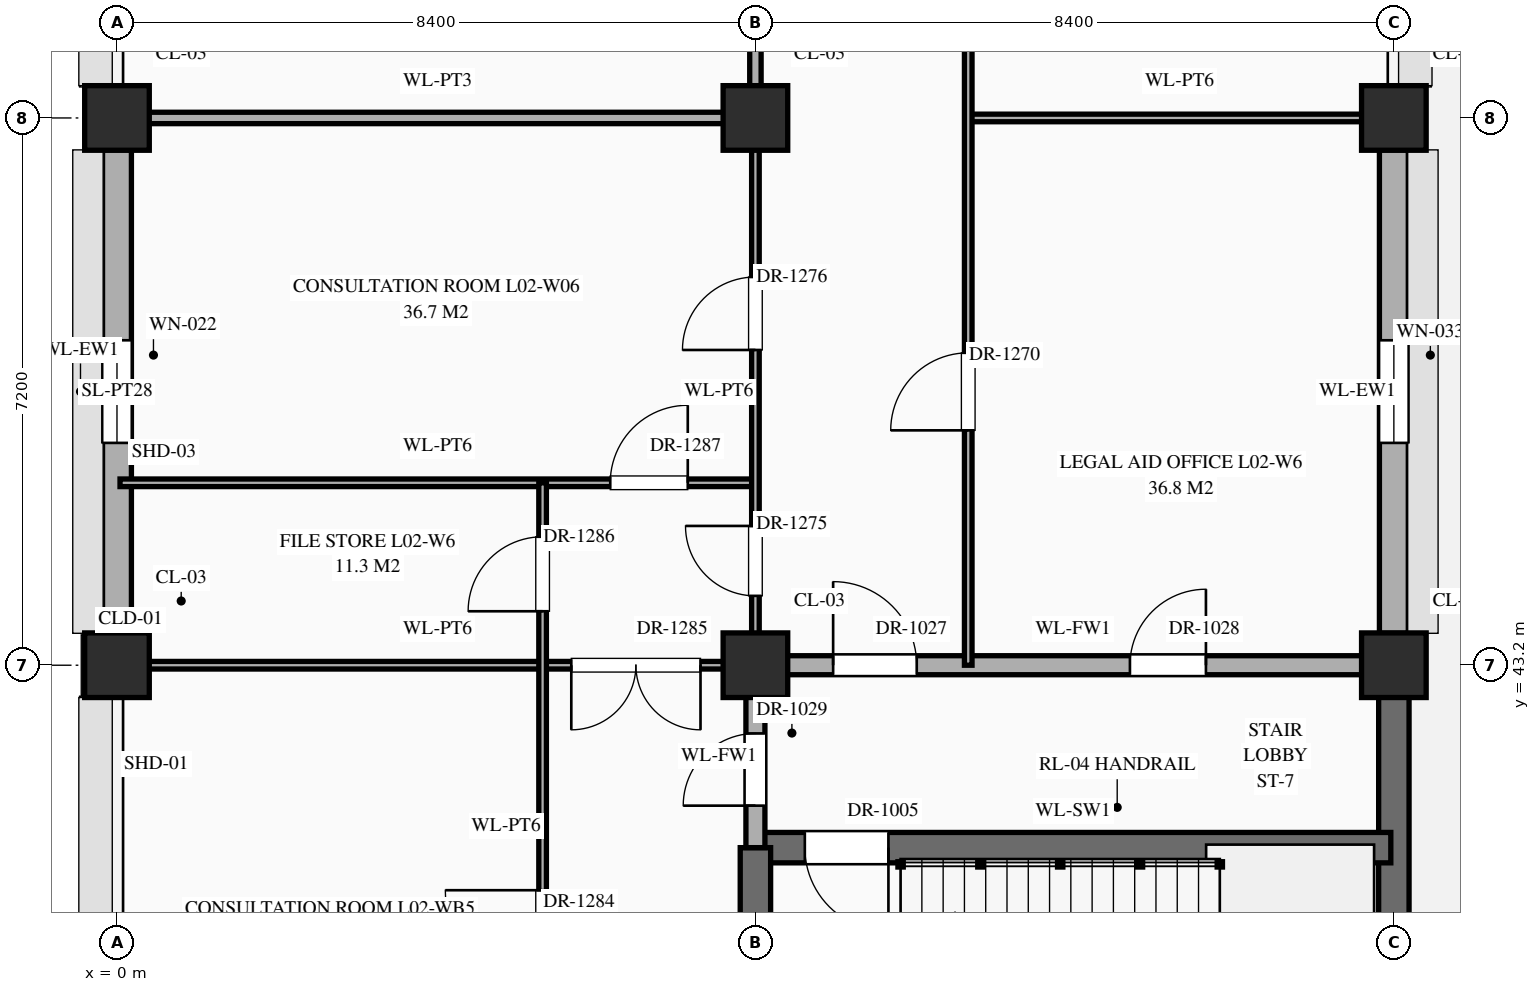
"""IFC4 building model, lengths in metres.
Left out: names, types, materials, properties, quantities, classifications, styles, units other than length and angle.
Written with IfcOpenShell. Run it as: python <this file> out.ifc"""

import sys

from ifc_helpers import new_model, si_unit, direction, frame, frame_2d, origin, origin_2d, place, context, subcontext, project, spatial, rectangle, extrude, element, fill, save


model = new_model("IFC4")
c1 = context("Model", 3, precision=1e-05, world=origin(), true_north=direction((0.0, 1.0)))
c2 = subcontext(c1, "Body", "Model", "MODEL_VIEW")
j1 = project(units=[si_unit("LENGTHUNIT", "METRE"), si_unit("PLANEANGLEUNIT", "RADIAN")], contexts=[c1])
p1 = place(None, origin())
s1 = spatial("IfcSite", under=j1, at=p1, CompositionType="ELEMENT")
p2 = place(p1, origin())
s2 = spatial("IfcBuilding", under=s1, at=p2, CompositionType="ELEMENT")
p3 = place(p2, frame((0.0, 0.0, 5.4)))
s3 = spatial("IfcBuildingStorey", under=s2, at=p3, CompositionType="ELEMENT", Elevation=5.4)
for number, where, z_axis, x_axis in (
    (1, (0.0, 43.2, 0.0), (0.0, 0.0, 1.0), (1.0, 0.0, 0.0)),
    (2, (0.0, 50.4, 0.0), (0.0, 0.0, 1.0), (1.0, 0.0, 0.0)),
    (3, (8.4, 43.2, 0.0), (0.0, 0.0, 1.0), (1.0, 0.0, 0.0)),
    (4, (8.4, 50.4, 0.0), (0.0, 0.0, 1.0), (1.0, 0.0, 0.0)),
    (5, (16.8, 43.2, 0.0), (0.0, 0.0, 1.0), (1.0, 0.0, 0.0)),
    (6, (16.8, 50.4, 0.0), (0.0, 0.0, 1.0), (1.0, 0.0, 0.0)),
):
    element("IfcColumn", number, at=place(p3, frame(where, z_axis=z_axis, x_axis=x_axis)), inside=s3, PredefinedType="COLUMN", context=c2, shape_type="SweptSolid", body=[
        extrude(rectangle(XDim=0.85, YDim=0.85, at=origin_2d()), origin(), (0.0, 0.0, 1.0), 5.4),
    ])
p4 = place(p3, frame((0.0, 43.62, 0.0), z_axis=(0.0, 0.0, 1.0), x_axis=(0.0, 1.0, 0.0)))
e7 = element("IfcWall", 7, at=p4, inside=s3, PredefinedType="STANDARD", context=c2, shape_type="SweptSolid", body=[
    extrude(rectangle(XDim=6.36, YDim=0.38, at=frame_2d((3.18, 0.0))), origin(), (0.0, 0.0, 1.0), 4.47),
])
p5 = place(p4, frame((2.505, 0.0, 0.85)))
e8 = element("IfcOpeningElement", 8, at=p5, cuts=e7, PredefinedType="OPENING", context=c2, shape_type="SweptSolid", body=[
    extrude(rectangle(XDim=1.35, YDim=1.56, at=frame_2d((0.675, 0.78))), frame((0.0, 0.202, 0.0), z_axis=(0.0, -1.0, 0.0), x_axis=(1.0, 0.0, 0.0)), (0.0, 0.0, 1.0), 0.404),
])
p6 = place(p3, frame((16.8, 36.42, 0.0), z_axis=(0.0, 0.0, 1.0), x_axis=(0.0, 1.0, 0.0)))
e9 = element("IfcWall", 9, at=p6, inside=s3, PredefinedType="SHEAR", context=c2, shape_type="SweptSolid", body=[
    extrude(rectangle(XDim=6.36, YDim=0.4, at=frame_2d((3.18, 0.0))), origin(), (0.0, 0.0, 1.0), 5.12),
])
p7 = place(p3, frame((16.8, 43.62, 0.0), z_axis=(0.0, 0.0, 1.0), x_axis=(0.0, 1.0, 0.0)))
e10 = element("IfcWall", 10, at=p7, inside=s3, PredefinedType="STANDARD", context=c2, shape_type="SweptSolid", body=[
    extrude(rectangle(XDim=6.36, YDim=0.38, at=frame_2d((3.18, 0.0))), origin(), (0.0, 0.0, 1.0), 4.47),
])
p8 = place(p7, frame((2.505, 0.0, 0.85)))
e11 = element("IfcOpeningElement", 11, at=p8, cuts=e10, PredefinedType="OPENING", context=c2, shape_type="SweptSolid", body=[
    extrude(rectangle(XDim=1.35, YDim=1.2, at=frame_2d((0.675, 0.6))), frame((0.0, 0.202, 0.0), z_axis=(0.0, -1.0, 0.0), x_axis=(1.0, 0.0, 0.0)), (0.0, 0.0, 1.0), 0.404),
])
p9 = place(p3, frame((8.4, 40.8, 0.0), z_axis=(0.0, 0.0, 1.0), x_axis=(1.0, 0.0, 0.0)))
e12 = element("IfcWall", 12, at=p9, inside=s3, PredefinedType="SHEAR", context=c2, shape_type="SweptSolid", body=[
    extrude(rectangle(XDim=8.36, YDim=0.4, at=frame_2d((4.18, 0.0))), origin(), (0.0, 0.0, 1.0), 5.12),
])
p10 = place(p9, frame((0.65, 0.0, 0.0)))
e13 = element("IfcOpeningElement", 13, at=p10, cuts=e12, PredefinedType="OPENING", context=c2, shape_type="SweptSolid", body=[
    extrude(rectangle(XDim=1.1, YDim=2.2, at=frame_2d((0.55, 1.1))), frame((0.0, 0.212, 0.0), z_axis=(0.0, -1.0, 0.0), x_axis=(1.0, 0.0, 0.0)), (0.0, 0.0, 1.0), 0.424),
])
p11 = place(p3, frame((0.04, 43.2, 0.0), z_axis=(0.0, 0.0, 1.0), x_axis=(1.0, 0.0, 0.0)))
e14 = element("IfcWall", 14, at=p11, inside=s3, PredefinedType="STANDARD", context=c2, shape_type="SweptSolid", body=[
    extrude(rectangle(XDim=8.36, YDim=0.1, at=frame_2d((4.18, 0.0))), origin(), (0.0, 0.0, 1.0), 4.27),
])
p12 = place(p11, frame((5.938, 0.0, 0.0)))
e15 = element("IfcOpeningElement", 15, at=p12, cuts=e14, PredefinedType="OPENING", context=c2, shape_type="SweptSolid", body=[
    extrude(rectangle(XDim=1.7, YDim=2.45, at=frame_2d((0.85, 1.225))), frame((0.0, 0.062, 0.0), z_axis=(0.0, -1.0, 0.0), x_axis=(1.0, 0.0, 0.0)), (0.0, 0.0, 1.0), 0.124),
])
p13 = place(p3, frame((8.4, 43.2, 0.0), z_axis=(0.0, 0.0, 1.0), x_axis=(1.0, 0.0, 0.0)))
e16 = element("IfcWall", 16, at=p13, inside=s3, PredefinedType="STANDARD", context=c2, shape_type="SweptSolid", body=[
    extrude(rectangle(XDim=8.36, YDim=0.25, at=frame_2d((4.18, 0.0))), origin(), (0.0, 0.0, 1.0), 4.27),
])
p14 = place(p13, frame((1.022, 0.0, 0.0)))
e17 = element("IfcOpeningElement", 17, at=p14, cuts=e16, PredefinedType="OPENING", context=c2, shape_type="SweptSolid", body=[
    extrude(rectangle(XDim=1.1, YDim=2.2, at=frame_2d((0.55, 1.1))), frame((0.0, 0.137, 0.0), z_axis=(0.0, -1.0, 0.0), x_axis=(1.0, 0.0, 0.0)), (0.0, 0.0, 1.0), 0.274),
])
p15 = place(p13, frame((4.927, 0.0, 0.0)))
e18 = element("IfcOpeningElement", 18, at=p15, cuts=e16, PredefinedType="OPENING", context=c2, shape_type="SweptSolid", body=[
    extrude(rectangle(XDim=1.0, YDim=2.2, at=frame_2d((0.5, 1.1))), frame((0.0, 0.137, 0.0), z_axis=(0.0, -1.0, 0.0), x_axis=(1.0, 0.0, 0.0)), (0.0, 0.0, 1.0), 0.274),
])
p16 = place(p3, frame((0.04, 45.6, 0.0), z_axis=(0.0, 0.0, 1.0), x_axis=(1.0, 0.0, 0.0)))
e19 = element("IfcWall", 19, at=p16, inside=s3, PredefinedType="STANDARD", context=c2, shape_type="SweptSolid", body=[
    extrude(rectangle(XDim=8.36, YDim=0.1, at=frame_2d((4.18, 0.0))), origin(), (0.0, 0.0, 1.0), 5.12),
])
p17 = place(p16, frame((6.45, 0.0, 0.0)))
e20 = element("IfcOpeningElement", 20, at=p17, cuts=e19, PredefinedType="OPENING", context=c2, shape_type="SweptSolid", body=[
    extrude(rectangle(XDim=1.02, YDim=2.4, at=frame_2d((0.51, 1.2))), frame((0.0, 0.062, 0.0), z_axis=(0.0, -1.0, 0.0), x_axis=(1.0, 0.0, 0.0)), (0.0, 0.0, 1.0), 0.124),
])
p18 = place(p3, frame((0.04, 50.4, 0.0), z_axis=(0.0, 0.0, 1.0), x_axis=(1.0, 0.0, 0.0)))
e21 = element("IfcWall", 21, at=p18, inside=s3, PredefinedType="STANDARD", context=c2, shape_type="SweptSolid", body=[
    extrude(rectangle(XDim=8.36, YDim=0.15, at=frame_2d((4.18, 0.0))), origin(), (0.0, 0.0, 1.0), 4.27),
])
p19 = place(p3, frame((11.2, 50.4, 0.0), z_axis=(0.0, 0.0, 1.0), x_axis=(1.0, 0.0, 0.0)))
e22 = element("IfcWall", 22, at=p19, inside=s3, PredefinedType="STANDARD", context=c2, shape_type="SweptSolid", body=[
    extrude(rectangle(XDim=5.56, YDim=0.1, at=frame_2d((2.78, 0.0))), origin(), (0.0, 0.0, 1.0), 4.27),
])
p20 = place(p3, frame((5.6, 33.6, 0.0), z_axis=(0.0, 0.0, 1.0), x_axis=(0.0, 1.0, 0.0)))
e23 = element("IfcWall", 23, at=p20, inside=s3, PredefinedType="STANDARD", context=c2, shape_type="SweptSolid", body=[
    extrude(rectangle(XDim=12.0, YDim=0.1, at=frame_2d((6.0, 0.0))), origin(), (0.0, 0.0, 1.0), 5.12),
])
p21 = place(p20, frame((0.6, 0.0, 0.0)))
e24 = element("IfcOpeningElement", 24, at=p21, cuts=e23, PredefinedType="OPENING", context=c2, shape_type="SweptSolid", body=[
    extrude(rectangle(XDim=1.2, YDim=2.35, at=frame_2d((0.6, 1.175))), frame((0.0, 0.062, 0.0), z_axis=(0.0, -1.0, 0.0), x_axis=(1.0, 0.0, 0.0)), (0.0, 0.0, 1.0), 0.124),
])
p22 = place(p20, frame((5.36, 0.0, 0.0)))
e25 = element("IfcOpeningElement", 25, at=p22, cuts=e23, PredefinedType="OPENING", context=c2, shape_type="SweptSolid", body=[
    extrude(rectangle(XDim=1.28, YDim=2.35, at=frame_2d((0.64, 1.175))), frame((0.0, 0.062, 0.0), z_axis=(0.0, -1.0, 0.0), x_axis=(1.0, 0.0, 0.0)), (0.0, 0.0, 1.0), 0.124),
])
p23 = place(p20, frame((10.31, 0.0, 0.0)))
e26 = element("IfcOpeningElement", 26, at=p23, cuts=e23, PredefinedType="OPENING", context=c2, shape_type="SweptSolid", body=[
    extrude(rectangle(XDim=0.98, YDim=2.35, at=frame_2d((0.49, 1.175))), frame((0.0, 0.062, 0.0), z_axis=(0.0, -1.0, 0.0), x_axis=(1.0, 0.0, 0.0)), (0.0, 0.0, 1.0), 0.124),
])
p24 = place(p3, frame((8.4, 36.0, 0.0), z_axis=(0.0, 0.0, 1.0), x_axis=(0.0, 1.0, 0.0)))
e27 = element("IfcWall", 27, at=p24, inside=s3, PredefinedType="SHEAR", context=c2, shape_type="SweptSolid", body=[
    extrude(rectangle(XDim=4.8, YDim=0.4, at=frame_2d((2.4, 0.0))), origin(), (0.0, 0.0, 1.0), 5.12),
])
p25 = place(p3, frame((8.4, 40.8, 0.0), z_axis=(0.0, 0.0, 1.0), x_axis=(0.0, 1.0, 0.0)))
e28 = element("IfcWall", 28, at=p25, inside=s3, PredefinedType="STANDARD", context=c2, shape_type="SweptSolid", body=[
    extrude(rectangle(XDim=2.4, YDim=0.25, at=frame_2d((1.2, 0.0))), origin(), (0.0, 0.0, 1.0), 4.37),
])
p26 = place(p25, frame((0.552, 0.0, 0.0)))
e29 = element("IfcOpeningElement", 29, at=p26, cuts=e28, PredefinedType="OPENING", context=c2, shape_type="SweptSolid", body=[
    extrude(rectangle(XDim=0.95, YDim=2.15, at=frame_2d((0.475, 1.075))), frame((0.0, 0.137, 0.0), z_axis=(0.0, -1.0, 0.0), x_axis=(1.0, 0.0, 0.0)), (0.0, 0.0, 1.0), 0.274),
])
p27 = place(p3, frame((8.4, 43.2, 0.0), z_axis=(0.0, 0.0, 1.0), x_axis=(0.0, 1.0, 0.0)))
e30 = element("IfcWall", 30, at=p27, inside=s3, PredefinedType="STANDARD", context=c2, shape_type="SweptSolid", body=[
    extrude(rectangle(XDim=7.2, YDim=0.1, at=frame_2d((3.6, 0.0))), origin(), (0.0, 0.0, 1.0), 4.37),
])
p28 = place(p27, frame((0.913, 0.0, 0.0)))
e31 = element("IfcOpeningElement", 31, at=p28, cuts=e30, PredefinedType="OPENING", context=c2, shape_type="SweptSolid", body=[
    extrude(rectangle(XDim=0.92, YDim=2.15, at=frame_2d((0.46, 1.075))), frame((0.0, 0.062, 0.0), z_axis=(0.0, -1.0, 0.0), x_axis=(1.0, 0.0, 0.0)), (0.0, 0.0, 1.0), 0.124),
])
p29 = place(p27, frame((4.147, 0.0, 0.0)))
e32 = element("IfcOpeningElement", 32, at=p29, cuts=e30, PredefinedType="OPENING", context=c2, shape_type="SweptSolid", body=[
    extrude(rectangle(XDim=0.96, YDim=2.2, at=frame_2d((0.48, 1.1))), frame((0.0, 0.062, 0.0), z_axis=(0.0, -1.0, 0.0), x_axis=(1.0, 0.0, 0.0)), (0.0, 0.0, 1.0), 0.124),
])
p30 = place(p3, frame((8.4, 50.4, 0.0), z_axis=(0.0, 0.0, 1.0), x_axis=(0.0, 1.0, 0.0)))
e33 = element("IfcWall", 33, at=p30, inside=s3, PredefinedType="STANDARD", context=c2, shape_type="SweptSolid", body=[
    extrude(rectangle(XDim=33.6, YDim=0.15, at=frame_2d((16.8, 0.0))), origin(), (0.0, 0.0, 1.0), 4.37),
])
p31 = place(p30, frame((30.863, 0.0, 0.0)))
e34 = element("IfcOpeningElement", 34, at=p31, cuts=e33, PredefinedType="OPENING", context=c2, shape_type="SweptSolid", body=[
    extrude(rectangle(XDim=1.02, YDim=2.4, at=frame_2d((0.51, 1.2))), frame((0.0, 0.087, 0.0), z_axis=(0.0, -1.0, 0.0), x_axis=(1.0, 0.0, 0.0)), (0.0, 0.0, 1.0), 0.174),
])
p32 = place(p30, frame((3.1, 0.0, 0.0)))
e35 = element("IfcOpeningElement", 35, at=p32, cuts=e33, PredefinedType="OPENING", context=c2, shape_type="SweptSolid", body=[
    extrude(rectangle(XDim=1.0, YDim=2.25, at=frame_2d((0.5, 1.125))), frame((0.0, 0.087, 0.0), z_axis=(0.0, -1.0, 0.0), x_axis=(1.0, 0.0, 0.0)), (0.0, 0.0, 1.0), 0.174),
])
p33 = place(p30, frame((10.28, 0.0, 0.0)))
e36 = element("IfcOpeningElement", 36, at=p33, cuts=e33, PredefinedType="OPENING", context=c2, shape_type="SweptSolid", body=[
    extrude(rectangle(XDim=1.04, YDim=2.2, at=frame_2d((0.52, 1.1))), frame((0.0, 0.087, 0.0), z_axis=(0.0, -1.0, 0.0), x_axis=(1.0, 0.0, 0.0)), (0.0, 0.0, 1.0), 0.174),
])
p34 = place(p30, frame((17.46, 0.0, 0.0)))
e37 = element("IfcOpeningElement", 37, at=p34, cuts=e33, PredefinedType="OPENING", context=c2, shape_type="SweptSolid", body=[
    extrude(rectangle(XDim=1.08, YDim=2.25, at=frame_2d((0.54, 1.125))), frame((0.0, 0.087, 0.0), z_axis=(0.0, -1.0, 0.0), x_axis=(1.0, 0.0, 0.0)), (0.0, 0.0, 1.0), 0.174),
])
p35 = place(p30, frame((24.64, 0.0, 0.0)))
e38 = element("IfcOpeningElement", 38, at=p35, cuts=e33, PredefinedType="OPENING", context=c2, shape_type="SweptSolid", body=[
    extrude(rectangle(XDim=1.12, YDim=2.25, at=frame_2d((0.56, 1.125))), frame((0.0, 0.087, 0.0), z_axis=(0.0, -1.0, 0.0), x_axis=(1.0, 0.0, 0.0)), (0.0, 0.0, 1.0), 0.174),
])
p36 = place(p3, frame((11.2, 43.2, 0.0), z_axis=(0.0, 0.0, 1.0), x_axis=(0.0, 1.0, 0.0)))
e39 = element("IfcWall", 39, at=p36, inside=s3, PredefinedType="STANDARD", context=c2, shape_type="SweptSolid", body=[
    extrude(rectangle(XDim=40.8, YDim=0.1, at=frame_2d((20.4, 0.0))), origin(), (0.0, 0.0, 1.0), 5.12),
])
p37 = place(p36, frame((37.87, 0.0, 0.0)))
e40 = element("IfcOpeningElement", 40, at=p37, cuts=e39, PredefinedType="OPENING", context=c2, shape_type="SweptSolid", body=[
    extrude(rectangle(XDim=1.06, YDim=2.4, at=frame_2d((0.53, 1.2))), frame((0.0, 0.062, 0.0), z_axis=(0.0, -1.0, 0.0), x_axis=(1.0, 0.0, 0.0)), (0.0, 0.0, 1.0), 0.124),
])
p38 = place(p36, frame((3.09, 0.0, 0.0)))
e41 = element("IfcOpeningElement", 41, at=p38, cuts=e39, PredefinedType="OPENING", context=c2, shape_type="SweptSolid", body=[
    extrude(rectangle(XDim=1.02, YDim=2.4, at=frame_2d((0.51, 1.2))), frame((0.0, 0.062, 0.0), z_axis=(0.0, -1.0, 0.0), x_axis=(1.0, 0.0, 0.0)), (0.0, 0.0, 1.0), 0.124),
])
p39 = place(p36, frame((10.27, 0.0, 0.0)))
e42 = element("IfcOpeningElement", 42, at=p39, cuts=e39, PredefinedType="OPENING", context=c2, shape_type="SweptSolid", body=[
    extrude(rectangle(XDim=1.06, YDim=2.4, at=frame_2d((0.53, 1.2))), frame((0.0, 0.062, 0.0), z_axis=(0.0, -1.0, 0.0), x_axis=(1.0, 0.0, 0.0)), (0.0, 0.0, 1.0), 0.124),
])
p40 = place(p36, frame((17.43, 0.0, 0.0)))
e43 = element("IfcOpeningElement", 43, at=p40, cuts=e39, PredefinedType="OPENING", context=c2, shape_type="SweptSolid", body=[
    extrude(rectangle(XDim=1.14, YDim=2.4, at=frame_2d((0.57, 1.2))), frame((0.0, 0.062, 0.0), z_axis=(0.0, -1.0, 0.0), x_axis=(1.0, 0.0, 0.0)), (0.0, 0.0, 1.0), 0.124),
])
p41 = place(p36, frame((24.75, 0.0, 0.0)))
e44 = element("IfcOpeningElement", 44, at=p41, cuts=e39, PredefinedType="OPENING", context=c2, shape_type="SweptSolid", body=[
    extrude(rectangle(XDim=0.9, YDim=2.15, at=frame_2d((0.45, 1.075))), frame((0.0, 0.062, 0.0), z_axis=(0.0, -1.0, 0.0), x_axis=(1.0, 0.0, 0.0)), (0.0, 0.0, 1.0), 0.124),
])
p42 = place(p36, frame((31.97, 0.0, 0.0)))
e45 = element("IfcOpeningElement", 45, at=p42, cuts=e39, PredefinedType="OPENING", context=c2, shape_type="SweptSolid", body=[
    extrude(rectangle(XDim=0.86, YDim=2.1, at=frame_2d((0.43, 1.05))), frame((0.0, 0.062, 0.0), z_axis=(0.0, -1.0, 0.0), x_axis=(1.0, 0.0, 0.0)), (0.0, 0.0, 1.0), 0.124),
])
p43 = place(p5, origin())
e46 = element("IfcWindow", 46, at=p43, inside=s3, PartitioningType="SINGLE_PANEL", PredefinedType="WINDOW", context=c2, shape_type="SweptSolid", body=[
    extrude(rectangle(XDim=1.35, YDim=1.56, at=frame_2d((0.675, 0.78))), frame((0.0, 0.03, 0.0), z_axis=(0.0, -1.0, 0.0), x_axis=(1.0, 0.0, 0.0)), (0.0, 0.0, 1.0), 0.06),
])
fill(e8, e46)
p44 = place(p8, origin())
e47 = element("IfcWindow", 47, at=p44, inside=s3, PartitioningType="SINGLE_PANEL", PredefinedType="WINDOW", context=c2, shape_type="SweptSolid", body=[
    extrude(rectangle(XDim=1.35, YDim=1.2, at=frame_2d((0.675, 0.6))), frame((0.0, 0.03, 0.0), z_axis=(0.0, -1.0, 0.0), x_axis=(1.0, 0.0, 0.0)), (0.0, 0.0, 1.0), 0.06),
])
fill(e11, e47)
p45 = place(p10, frame((1.1, 0.0, 0.0), z_axis=(0.0, 0.0, 1.0), x_axis=(-1.0, 0.0, 0.0)))
e48 = element("IfcDoor", 48, at=p45, inside=s3, OperationType="SINGLE_SWING_LEFT", PredefinedType="DOOR", context=c2, shape_type="SweptSolid", body=[
    extrude(rectangle(XDim=1.1, YDim=2.2, at=frame_2d((0.55, 1.1))), frame((0.0, 0.025, 0.0), z_axis=(0.0, -1.0, 0.0), x_axis=(1.0, 0.0, 0.0)), (0.0, 0.0, 1.0), 0.05),
])
fill(e13, e48)
p46 = place(p14, origin())
e49 = element("IfcDoor", 49, at=p46, inside=s3, OperationType="SINGLE_SWING_LEFT", PredefinedType="DOOR", context=c2, shape_type="SweptSolid", body=[
    extrude(rectangle(XDim=1.1, YDim=2.2, at=frame_2d((0.55, 1.1))), frame((0.0, 0.025, 0.0), z_axis=(0.0, -1.0, 0.0), x_axis=(1.0, 0.0, 0.0)), (0.0, 0.0, 1.0), 0.05),
])
fill(e17, e49)
p47 = place(p15, origin())
e50 = element("IfcDoor", 50, at=p47, inside=s3, OperationType="SINGLE_SWING_RIGHT", PredefinedType="DOOR", context=c2, shape_type="SweptSolid", body=[
    extrude(rectangle(XDim=1.0, YDim=2.2, at=frame_2d((0.5, 1.1))), frame((0.0, 0.025, 0.0), z_axis=(0.0, -1.0, 0.0), x_axis=(1.0, 0.0, 0.0)), (0.0, 0.0, 1.0), 0.05),
])
fill(e18, e50)
p48 = place(p26, origin())
e51 = element("IfcDoor", 51, at=p48, inside=s3, OperationType="SINGLE_SWING_LEFT", PredefinedType="DOOR", context=c2, shape_type="SweptSolid", body=[
    extrude(rectangle(XDim=0.95, YDim=2.15, at=frame_2d((0.475, 1.075))), frame((0.0, 0.025, 0.0), z_axis=(0.0, -1.0, 0.0), x_axis=(1.0, 0.0, 0.0)), (0.0, 0.0, 1.0), 0.05),
])
fill(e29, e51)
p49 = place(p38, origin())
e52 = element("IfcDoor", 52, at=p49, inside=s3, OperationType="SINGLE_SWING_LEFT", PredefinedType="DOOR", context=c2, shape_type="SweptSolid", body=[
    extrude(rectangle(XDim=1.02, YDim=2.4, at=frame_2d((0.51, 1.2))), frame((0.0, 0.025, 0.0), z_axis=(0.0, -1.0, 0.0), x_axis=(1.0, 0.0, 0.0)), (0.0, 0.0, 1.0), 0.05),
])
fill(e41, e52)
p50 = place(p28, origin())
e53 = element("IfcDoor", 53, at=p50, inside=s3, OperationType="SINGLE_SWING_RIGHT", PredefinedType="DOOR", context=c2, shape_type="SweptSolid", body=[
    extrude(rectangle(XDim=0.92, YDim=2.15, at=frame_2d((0.46, 1.075))), frame((0.0, 0.025, 0.0), z_axis=(0.0, -1.0, 0.0), x_axis=(1.0, 0.0, 0.0)), (0.0, 0.0, 1.0), 0.05),
])
fill(e31, e53)
p51 = place(p29, origin())
e54 = element("IfcDoor", 54, at=p51, inside=s3, OperationType="SINGLE_SWING_LEFT", PredefinedType="DOOR", context=c2, shape_type="SweptSolid", body=[
    extrude(rectangle(XDim=0.96, YDim=2.2, at=frame_2d((0.48, 1.1))), frame((0.0, 0.025, 0.0), z_axis=(0.0, -1.0, 0.0), x_axis=(1.0, 0.0, 0.0)), (0.0, 0.0, 1.0), 0.05),
])
fill(e32, e54)
p52 = place(p22, origin())
e55 = element("IfcDoor", 55, at=p52, inside=s3, OperationType="SINGLE_SWING_RIGHT", PredefinedType="DOOR", context=c2, shape_type="SweptSolid", body=[
    extrude(rectangle(XDim=1.28, YDim=2.35, at=frame_2d((0.64, 1.175))), frame((0.0, 0.025, 0.0), z_axis=(0.0, -1.0, 0.0), x_axis=(1.0, 0.0, 0.0)), (0.0, 0.0, 1.0), 0.05),
])
fill(e25, e55)
p53 = place(p12, frame((1.7, 0.0, 0.0), z_axis=(0.0, 0.0, 1.0), x_axis=(-1.0, 0.0, 0.0)))
e56 = element("IfcDoor", 56, at=p53, inside=s3, OperationType="DOUBLE_DOOR_SINGLE_SWING", PredefinedType="DOOR", context=c2, shape_type="SweptSolid", body=[
    extrude(rectangle(XDim=1.7, YDim=2.45, at=frame_2d((0.85, 1.225))), frame((0.0, 0.025, 0.0), z_axis=(0.0, -1.0, 0.0), x_axis=(1.0, 0.0, 0.0)), (0.0, 0.0, 1.0), 0.05),
])
fill(e15, e56)
p54 = place(p23, origin())
e57 = element("IfcDoor", 57, at=p54, inside=s3, OperationType="SINGLE_SWING_LEFT", PredefinedType="DOOR", context=c2, shape_type="SweptSolid", body=[
    extrude(rectangle(XDim=0.98, YDim=2.35, at=frame_2d((0.49, 1.175))), frame((0.0, 0.025, 0.0), z_axis=(0.0, -1.0, 0.0), x_axis=(1.0, 0.0, 0.0)), (0.0, 0.0, 1.0), 0.05),
])
fill(e26, e57)
p55 = place(p17, origin())
e58 = element("IfcDoor", 58, at=p55, inside=s3, OperationType="SINGLE_SWING_RIGHT", PredefinedType="DOOR", context=c2, shape_type="SweptSolid", body=[
    extrude(rectangle(XDim=1.02, YDim=2.4, at=frame_2d((0.51, 1.2))), frame((0.0, 0.025, 0.0), z_axis=(0.0, -1.0, 0.0), x_axis=(1.0, 0.0, 0.0)), (0.0, 0.0, 1.0), 0.05),
])
fill(e20, e58)
save(model, sys.argv[1])
